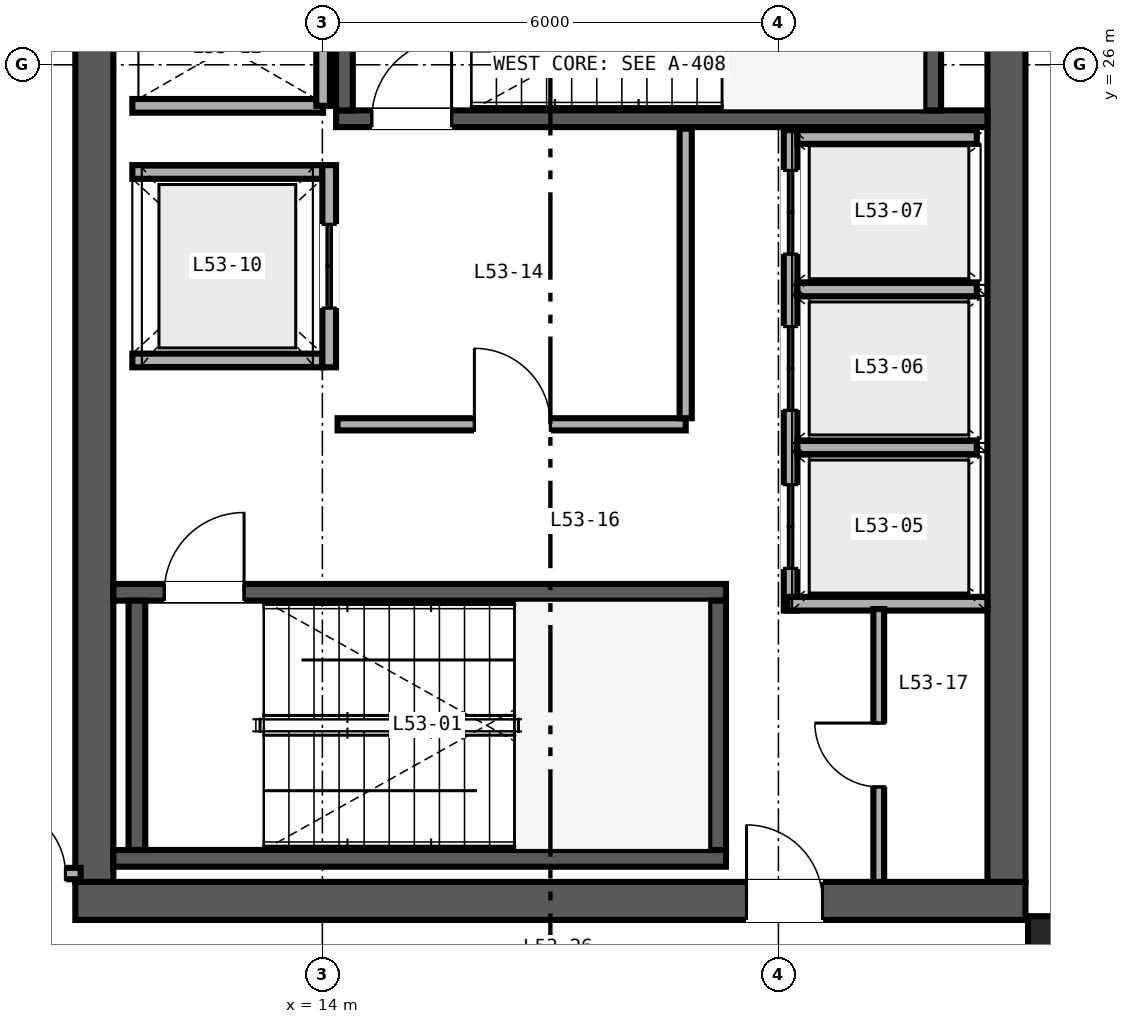
"""IFC4 building model, lengths in metres.
Left out: names, types, materials, properties, quantities, classifications, styles, units other than length and angle.
Written with IfcOpenShell. Run it as: python <this file> out.ifc"""

import sys

from ifc_helpers import new_model, si_unit, direction, frame, frame_2d, origin, origin_2d, place, context, subcontext, project, spatial, rectangle, i_section, extrude, source, transform, mapped, element, fill, save


model = new_model("IFC4")
c1 = context("Model", 3, precision=1e-05, world=origin(), true_north=direction((0.0, 1.0)))
c2 = subcontext(c1, "Body", "Model", "MODEL_VIEW")
j1 = project(units=[si_unit("LENGTHUNIT", "METRE"), si_unit("PLANEANGLEUNIT", "RADIAN")], contexts=[c1])
p1 = place(None, origin())
s1 = spatial("IfcSite", under=j1, at=p1, CompositionType="ELEMENT")
p2 = place(p1, origin())
s2 = spatial("IfcBuilding", under=s1, at=p2, CompositionType="ELEMENT")
p3 = place(p2, frame((0.0, 0.0, 210.0)))
s3 = spatial("IfcBuildingStorey", under=s2, at=p3, CompositionType="ELEMENT", Elevation=210.0)
p4 = place(p3, frame((10.75, 15.0, 0.0), z_axis=(0.0, 0.0, 1.0), x_axis=(1.0, 0.0, 0.0)))
e1 = element("IfcWall", 1, at=p4, inside=s3, PredefinedType="SHEAR", context=c2, shape_type="SweptSolid", body=[
    extrude(rectangle(XDim=12.5, YDim=0.5, at=frame_2d((6.25, 0.0))), origin(), (0.0, 0.0, 1.0), 3.37),
])
p5 = place(p4, frame((8.83, 0.0, 0.0)))
e2 = element("IfcOpeningElement", 2, at=p5, cuts=e1, PredefinedType="OPENING", context=c2, shape_type="SweptSolid", body=[
    extrude(rectangle(XDim=1.0, YDim=2.15, at=frame_2d((0.5, 1.075))), frame((0.0, 0.26, 0.0), z_axis=(0.0, -1.0, 0.0), x_axis=(1.0, 0.0, 0.0)), (0.0, 0.0, 1.0), 0.52),
])
for number, where, z_axis, x_axis in (
    (3, (11.0, 15.25, 0.0), (0.0, 0.0, 1.0), (0.0, 1.0, 0.0)),
    (4, (23.0, 15.25, 0.0), (0.0, 0.0, 1.0), (0.0, 1.0, 0.0)),
):
    element("IfcWall", number, at=place(p3, frame(where, z_axis=z_axis, x_axis=x_axis)), inside=s3, PredefinedType="SHEAR", context=c2, shape_type="SweptSolid", body=[
        extrude(rectangle(XDim=21.5, YDim=0.5, at=frame_2d((10.75, 0.0))), origin(), (0.0, 0.0, 1.0), 3.37),
    ])
p6 = place(p3, frame((11.25, 15.56, 0.0), z_axis=(0.0, 0.0, 1.0), x_axis=(1.0, 0.0, 0.0)))
e5 = element("IfcWall", 5, at=p6, inside=s3, PredefinedType="SHEAR", context=c2, shape_type="SweptSolid", body=[
    extrude(rectangle(XDim=8.06, YDim=0.22, at=frame_2d((4.03, 0.0))), origin(), (0.0, 0.0, 1.0), 3.4),
])
p7 = place(p3, frame((11.25, 19.06, 0.0), z_axis=(0.0, 0.0, 1.0), x_axis=(1.0, 0.0, 0.0)))
e6 = element("IfcWall", 6, at=p7, inside=s3, PredefinedType="SHEAR", context=c2, shape_type="SweptSolid", body=[
    extrude(rectangle(XDim=8.06, YDim=0.22, at=frame_2d((4.03, 0.0))), origin(), (0.0, 0.0, 1.0), 3.4),
])
p8 = place(p7, frame((0.67, 0.0, 0.0)))
e7 = element("IfcOpeningElement", 7, at=p8, cuts=e6, PredefinedType="OPENING", context=c2, shape_type="SweptSolid", body=[
    extrude(rectangle(XDim=1.05, YDim=2.15, at=frame_2d((0.525, 1.075))), frame((0.0, 0.12, 0.0), z_axis=(0.0, -1.0, 0.0), x_axis=(1.0, 0.0, 0.0)), (0.0, 0.0, 1.0), 0.24),
])
for number, where, z_axis, x_axis in (
    (8, (11.56, 15.67, 0.0), (0.0, 0.0, 1.0), (0.0, 1.0, 0.0)),
    (9, (19.2, 15.67, 0.0), (0.0, 0.0, 1.0), (0.0, 1.0, 0.0)),
):
    element("IfcWall", number, at=place(p3, frame(where, z_axis=z_axis, x_axis=x_axis)), inside=s3, PredefinedType="SHEAR", context=c2, shape_type="SweptSolid", body=[
        extrude(rectangle(XDim=3.28, YDim=0.22, at=frame_2d((1.64, 0.0))), origin(), (0.0, 0.0, 1.0), 3.4),
    ])
p9 = place(p3, frame((14.18, 25.29, 0.0), z_axis=(0.0, 0.0, 1.0), x_axis=(1.0, 0.0, 0.0)))
e10 = element("IfcWall", 10, at=p9, inside=s3, PredefinedType="SHEAR", context=c2, shape_type="SweptSolid", body=[
    extrude(rectangle(XDim=8.57, YDim=0.22, at=frame_2d((4.285, 0.0))), origin(), (0.0, 0.0, 1.0), 3.4),
])
p10 = place(p9, frame((0.47, 0.0, 0.0)))
e11 = element("IfcOpeningElement", 11, at=p10, cuts=e10, PredefinedType="OPENING", context=c2, shape_type="SweptSolid", body=[
    extrude(rectangle(XDim=1.05, YDim=2.15, at=frame_2d((0.525, 1.075))), frame((0.0, 0.12, 0.0), z_axis=(0.0, -1.0, 0.0), x_axis=(1.0, 0.0, 0.0)), (0.0, 0.0, 1.0), 0.24),
])
for number, where, z_axis, x_axis in (
    (12, (14.29, 25.4, 0.0), (0.0, 0.0, 1.0), (0.0, 1.0, 0.0)),
    (13, (22.03, 25.4, 0.0), (0.0, 0.0, 1.0), (0.0, 1.0, 0.0)),
):
    element("IfcWall", number, at=place(p3, frame(where, z_axis=z_axis, x_axis=x_axis)), inside=s3, PredefinedType="SHEAR", context=c2, shape_type="SweptSolid", body=[
        extrude(rectangle(XDim=3.28, YDim=0.22, at=frame_2d((1.64, 0.0))), origin(), (0.0, 0.0, 1.0), 3.4),
    ])
m1 = source(origin(), c2, "Body", "SweptSolid", [
    extrude(i_section(OverallWidth=0.432, OverallDepth=0.498, WebThickness=0.056, FlangeThickness=0.089, FilletRadius=0.025, at=origin_2d()), origin(), (0.0, 0.0, 1.0), 3.37),
])
p11 = place(p3, frame((23.5, 14.55, 0.0), z_axis=(0.0, 0.0, 1.0), x_axis=(1.0, 0.0, 0.0)))
e14 = element("IfcColumn", 14, at=p11, inside=s3, PredefinedType="COLUMN", context=c2, shape_type="MappedRepresentation", body=[
    mapped(m1, transform((0.0, 0.0, 0.0), scale=1.0)),
])
p12 = place(p3, frame((20.16, 18.82, 0.0), z_axis=(0.0, 0.0, 1.0), x_axis=(0.0, 1.0, 0.0)))
e15 = element("IfcWall", 15, at=p12, inside=s3, PredefinedType="SOLIDWALL", context=c2, shape_type="SweptSolid", body=[
    extrude(rectangle(XDim=6.32, YDim=0.18, at=frame_2d((3.16, 0.0))), origin(), (0.0, 0.0, 1.0), 2.47),
])
p13 = place(p12, frame((0.555, 0.0, 0.0)))
e16 = element("IfcOpeningElement", 16, at=p13, cuts=e15, PredefinedType="OPENING", context=c2, shape_type="SweptSolid", body=[
    extrude(rectangle(XDim=1.1, YDim=2.2, at=frame_2d((0.55, 1.1))), frame((0.0, 0.1, 0.0), z_axis=(0.0, -1.0, 0.0), x_axis=(1.0, 0.0, 0.0)), (0.0, 0.0, 1.0), 0.2),
])
p14 = place(p12, frame((2.635, 0.0, 0.0)))
e17 = element("IfcOpeningElement", 17, at=p14, cuts=e15, PredefinedType="OPENING", context=c2, shape_type="SweptSolid", body=[
    extrude(rectangle(XDim=1.1, YDim=2.2, at=frame_2d((0.55, 1.1))), frame((0.0, 0.1, 0.0), z_axis=(0.0, -1.0, 0.0), x_axis=(1.0, 0.0, 0.0)), (0.0, 0.0, 1.0), 0.2),
])
p15 = place(p12, frame((4.69, 0.0, 0.0)))
e18 = element("IfcOpeningElement", 18, at=p15, cuts=e15, PredefinedType="OPENING", context=c2, shape_type="SweptSolid", body=[
    extrude(rectangle(XDim=1.1, YDim=2.2, at=frame_2d((0.55, 1.1))), frame((0.0, 0.1, 0.0), z_axis=(0.0, -1.0, 0.0), x_axis=(1.0, 0.0, 0.0)), (0.0, 0.0, 1.0), 0.2),
])
p16 = place(p3, frame((20.12, 18.91, 0.0), z_axis=(0.0, 0.0, 1.0), x_axis=(1.0, 0.0, 0.0)))
e19 = element("IfcWall", 19, at=p16, inside=s3, PredefinedType="SOLIDWALL", context=c2, shape_type="SweptSolid", body=[
    extrude(rectangle(XDim=2.63, YDim=0.18, at=frame_2d((1.315, 0.0))), origin(), (0.0, 0.0, 1.0), 3.37),
])
p17 = place(p3, frame((20.25, 25.05, 0.0), z_axis=(0.0, 0.0, 1.0), x_axis=(1.0, 0.0, 0.0)))
e20 = element("IfcWall", 20, at=p17, inside=s3, PredefinedType="SOLIDWALL", context=c2, shape_type="SweptSolid", body=[
    extrude(rectangle(XDim=2.36, YDim=0.18, at=frame_2d((1.18, 0.0))), origin(), (0.0, 0.0, 1.0), 3.37),
])
p18 = place(p3, frame((20.25, 20.965, 0.0), z_axis=(0.0, 0.0, 1.0), x_axis=(1.0, 0.0, 0.0)))
e21 = element("IfcWall", 21, at=p18, inside=s3, PredefinedType="SOLIDWALL", context=c2, shape_type="SweptSolid", body=[
    extrude(rectangle(XDim=2.36, YDim=0.18, at=frame_2d((1.18, 0.0))), origin(), (0.0, 0.0, 1.0), 2.47),
])
p19 = place(p3, frame((20.25, 23.045, 0.0), z_axis=(0.0, 0.0, 1.0), x_axis=(1.0, 0.0, 0.0)))
e22 = element("IfcWall", 22, at=p19, inside=s3, PredefinedType="SOLIDWALL", context=c2, shape_type="SweptSolid", body=[
    extrude(rectangle(XDim=2.36, YDim=0.18, at=frame_2d((1.18, 0.0))), origin(), (0.0, 0.0, 1.0), 3.37),
])
for number, where, z_axis, x_axis in (
    (23, (11.5, 22.11, 0.0), (0.0, 0.0, 1.0), (1.0, 0.0, 0.0)),
    (24, (11.5, 24.59, 0.0), (0.0, 0.0, 1.0), (1.0, 0.0, 0.0)),
):
    element("IfcWall", number, at=place(p3, frame(where, z_axis=z_axis, x_axis=x_axis)), inside=s3, PredefinedType="SOLIDWALL", context=c2, shape_type="SweptSolid", body=[
        extrude(rectangle(XDim=2.5, YDim=0.18, at=frame_2d((1.25, 0.0))), origin(), (0.0, 0.0, 1.0), 3.37),
    ])
p20 = place(p3, frame((14.09, 22.02, 0.0), z_axis=(0.0, 0.0, 1.0), x_axis=(0.0, 1.0, 0.0)))
e25 = element("IfcWall", 25, at=p20, inside=s3, PredefinedType="SOLIDWALL", context=c2, shape_type="SweptSolid", body=[
    extrude(rectangle(XDim=2.66, YDim=0.18, at=frame_2d((1.33, 0.0))), origin(), (0.0, 0.0, 1.0), 3.37),
])
p21 = place(p20, frame((0.78, 0.0, 0.0)))
e26 = element("IfcOpeningElement", 26, at=p21, cuts=e25, PredefinedType="OPENING", context=c2, shape_type="SweptSolid", body=[
    extrude(rectangle(XDim=1.1, YDim=2.2, at=frame_2d((0.55, 1.1))), frame((0.0, 0.1, 0.0), z_axis=(0.0, -1.0, 0.0), x_axis=(1.0, 0.0, 0.0)), (0.0, 0.0, 1.0), 0.2),
])
p22 = place(p3, frame((11.5, 25.46, 0.0), z_axis=(0.0, 0.0, 1.0), x_axis=(1.0, 0.0, 0.0)))
e27 = element("IfcWall", 27, at=p22, inside=s3, PredefinedType="SOLIDWALL", context=c2, shape_type="SweptSolid", body=[
    extrude(rectangle(XDim=2.51, YDim=0.18, at=frame_2d((1.255, 0.0))), origin(), (0.0, 0.0, 1.0), 3.37),
])
p23 = place(p3, frame((14.01, 25.46, 0.0), z_axis=(0.0, 0.0, 1.0), x_axis=(0.0, 1.0, 0.0)))
e28 = element("IfcWall", 28, at=p23, inside=s3, PredefinedType="SOLIDWALL", context=c2, shape_type="SweptSolid", body=[
    extrude(rectangle(XDim=3.08, YDim=0.18, at=frame_2d((1.54, 0.0))), origin(), (0.0, 0.0, 1.0), 3.37),
])
p24 = place(p3, frame((14.2, 21.27, 0.0), z_axis=(0.0, 0.0, 1.0), x_axis=(1.0, 0.0, 0.0)))
e29 = element("IfcWall", 29, at=p24, inside=s3, PredefinedType="PARTITIONING", context=c2, shape_type="SweptSolid", body=[
    extrude(rectangle(XDim=4.58, YDim=0.16, at=frame_2d((2.29, 0.0))), origin(), (0.0, 0.0, 1.0), 3.37),
])
p25 = place(p24, frame((1.8, 0.0, 0.0)))
e30 = element("IfcOpeningElement", 30, at=p25, cuts=e29, PredefinedType="OPENING", context=c2, shape_type="SweptSolid", body=[
    extrude(rectangle(XDim=1.0, YDim=2.15, at=frame_2d((0.5, 1.075))), frame((0.0, 0.09, 0.0), z_axis=(0.0, -1.0, 0.0), x_axis=(1.0, 0.0, 0.0)), (0.0, 0.0, 1.0), 0.18),
])
p26 = place(p3, frame((18.78, 21.35, 0.0), z_axis=(0.0, 0.0, 1.0), x_axis=(0.0, 1.0, 0.0)))
e31 = element("IfcWall", 31, at=p26, inside=s3, PredefinedType="PARTITIONING", context=c2, shape_type="SweptSolid", body=[
    extrude(rectangle(XDim=3.81, YDim=0.16, at=frame_2d((1.905, 0.0))), origin(), (0.0, 0.0, 1.0), 3.37),
])
p27 = place(p3, frame((21.32, 15.25, 0.0), z_axis=(0.0, 0.0, 1.0), x_axis=(0.0, 1.0, 0.0)))
e32 = element("IfcWall", 32, at=p27, inside=s3, PredefinedType="PARTITIONING", context=c2, shape_type="SweptSolid", body=[
    extrude(rectangle(XDim=3.59, YDim=0.142, at=frame_2d((1.795, 0.0))), origin(), (0.0, 0.0, 1.0), 3.37),
])
p28 = place(p27, frame((1.25, 0.0, 0.0)))
e33 = element("IfcOpeningElement", 33, at=p28, cuts=e32, PredefinedType="OPENING", context=c2, shape_type="SweptSolid", body=[
    extrude(rectangle(XDim=0.84, YDim=2.1, at=frame_2d((0.42, 1.05))), frame((0.0, 0.081, 0.0), z_axis=(0.0, -1.0, 0.0), x_axis=(1.0, 0.0, 0.0)), (0.0, 0.0, 1.0), 0.162),
])
p29 = place(p3, frame((8.16, 15.36, 0.0), z_axis=(0.0, 0.0, 1.0), x_axis=(1.0, 0.0, 0.0)))
e34 = element("IfcWall", 34, at=p29, inside=s3, PredefinedType="PARTITIONING", context=c2, shape_type="SweptSolid", body=[
    extrude(rectangle(XDim=2.66, YDim=0.15, at=frame_2d((1.33, 0.0))), origin(), (0.0, 0.0, 1.0), 2.591),
])
p30 = place(p29, frame((1.58, 0.0, 0.0)))
e35 = element("IfcOpeningElement", 35, at=p30, cuts=e34, PredefinedType="OPENING", context=c2, shape_type="SweptSolid", body=[
    extrude(rectangle(XDim=0.88, YDim=2.15, at=frame_2d((0.44, 1.075))), frame((0.0, 0.085, 0.0), z_axis=(0.0, -1.0, 0.0), x_axis=(1.0, 0.0, 0.0)), (0.0, 0.0, 1.0), 0.17),
])
m2 = source(origin(), c2, "Body", "SweptSolid", [
    extrude(rectangle(XDim=1.05, YDim=2.15, at=frame_2d((0.525, 1.075))), frame((0.0, 0.025, 0.0), z_axis=(0.0, -1.0, 0.0), x_axis=(1.0, 0.0, 0.0)), (0.0, 0.0, 1.0), 0.05),
])
p31 = place(p8, origin())
e36 = element("IfcDoor", 36, at=p31, inside=s3, OperationType="SINGLE_SWING_RIGHT", PredefinedType="DOOR", context=c2, shape_type="MappedRepresentation", body=[
    mapped(m2, transform((0.0, 0.0, 0.0), scale=1.0)),
])
fill(e7, e36)
p32 = place(p10, origin())
e37 = element("IfcDoor", 37, at=p32, inside=s3, OperationType="SINGLE_SWING_RIGHT", PredefinedType="DOOR", context=c2, shape_type="MappedRepresentation", body=[
    mapped(m2, transform((0.0, 0.0, 0.0), scale=1.0)),
])
fill(e11, e37)
m3 = source(origin(), c2, "Body", "SweptSolid", [
    extrude(rectangle(XDim=1.1, YDim=2.2, at=frame_2d((0.55, 1.1))), frame((0.0, 0.025, 0.0), z_axis=(0.0, -1.0, 0.0), x_axis=(1.0, 0.0, 0.0)), (0.0, 0.0, 1.0), 0.05),
])
p33 = place(p13, origin())
e38 = element("IfcDoor", 38, at=p33, inside=s3, OperationType="DOUBLE_DOOR_SLIDING", PredefinedType="DOOR", context=c2, shape_type="MappedRepresentation", body=[
    mapped(m3, transform((0.0, 0.0, 0.0), scale=1.0)),
])
fill(e16, e38)
p34 = place(p14, origin())
e39 = element("IfcDoor", 39, at=p34, inside=s3, OperationType="DOUBLE_DOOR_SLIDING", PredefinedType="DOOR", context=c2, shape_type="MappedRepresentation", body=[
    mapped(m3, transform((0.0, 0.0, 0.0), scale=1.0)),
])
fill(e17, e39)
p35 = place(p15, origin())
e40 = element("IfcDoor", 40, at=p35, inside=s3, OperationType="DOUBLE_DOOR_SLIDING", PredefinedType="DOOR", context=c2, shape_type="MappedRepresentation", body=[
    mapped(m3, transform((0.0, 0.0, 0.0), scale=1.0)),
])
fill(e18, e40)
p36 = place(p21, origin())
e41 = element("IfcDoor", 41, at=p36, inside=s3, OperationType="DOUBLE_DOOR_SLIDING", PredefinedType="DOOR", context=c2, shape_type="MappedRepresentation", body=[
    mapped(m3, transform((0.0, 0.0, 0.0), scale=1.0)),
])
fill(e26, e41)
m4 = source(origin(), c2, "Body", "SweptSolid", [
    extrude(rectangle(XDim=1.0, YDim=2.15, at=frame_2d((0.5, 1.075))), frame((0.0, 0.025, 0.0), z_axis=(0.0, -1.0, 0.0), x_axis=(1.0, 0.0, 0.0)), (0.0, 0.0, 1.0), 0.05),
])
p37 = place(p25, origin())
e42 = element("IfcDoor", 42, at=p37, inside=s3, OperationType="SINGLE_SWING_LEFT", PredefinedType="DOOR", context=c2, shape_type="MappedRepresentation", body=[
    mapped(m4, transform((0.0, 0.0, 0.0), scale=1.0)),
])
fill(e30, e42)
m5 = source(origin(), c2, "Body", "SweptSolid", [
    extrude(rectangle(XDim=0.84, YDim=2.1, at=frame_2d((0.42, 1.05))), frame((0.0, 0.025, 0.0), z_axis=(0.0, -1.0, 0.0), x_axis=(1.0, 0.0, 0.0)), (0.0, 0.0, 1.0), 0.05),
])
p38 = place(p28, origin())
e43 = element("IfcDoor", 43, at=p38, inside=s3, OperationType="SINGLE_SWING_RIGHT", PredefinedType="DOOR", context=c2, shape_type="MappedRepresentation", body=[
    mapped(m5, transform((0.0, 0.0, 0.0), scale=1.0)),
])
fill(e33, e43)
p39 = place(p5, origin())
e44 = element("IfcDoor", 44, at=p39, inside=s3, OperationType="SINGLE_SWING_LEFT", PredefinedType="DOOR", context=c2, shape_type="MappedRepresentation", body=[
    mapped(m4, transform((0.0, 0.0, 0.0), scale=1.0)),
])
fill(e2, e44)
m6 = source(origin(), c2, "Body", "SweptSolid", [
    extrude(rectangle(XDim=0.88, YDim=2.15, at=frame_2d((0.44, 1.075))), frame((0.0, 0.025, 0.0), z_axis=(0.0, -1.0, 0.0), x_axis=(1.0, 0.0, 0.0)), (0.0, 0.0, 1.0), 0.05),
])
p40 = place(p30, origin())
e45 = element("IfcDoor", 45, at=p40, inside=s3, OperationType="SINGLE_SWING_LEFT", PredefinedType="DOOR", context=c2, shape_type="MappedRepresentation", body=[
    mapped(m6, transform((0.0, 0.0, 0.0), scale=1.0)),
])
fill(e35, e45)
save(model, sys.argv[1])
